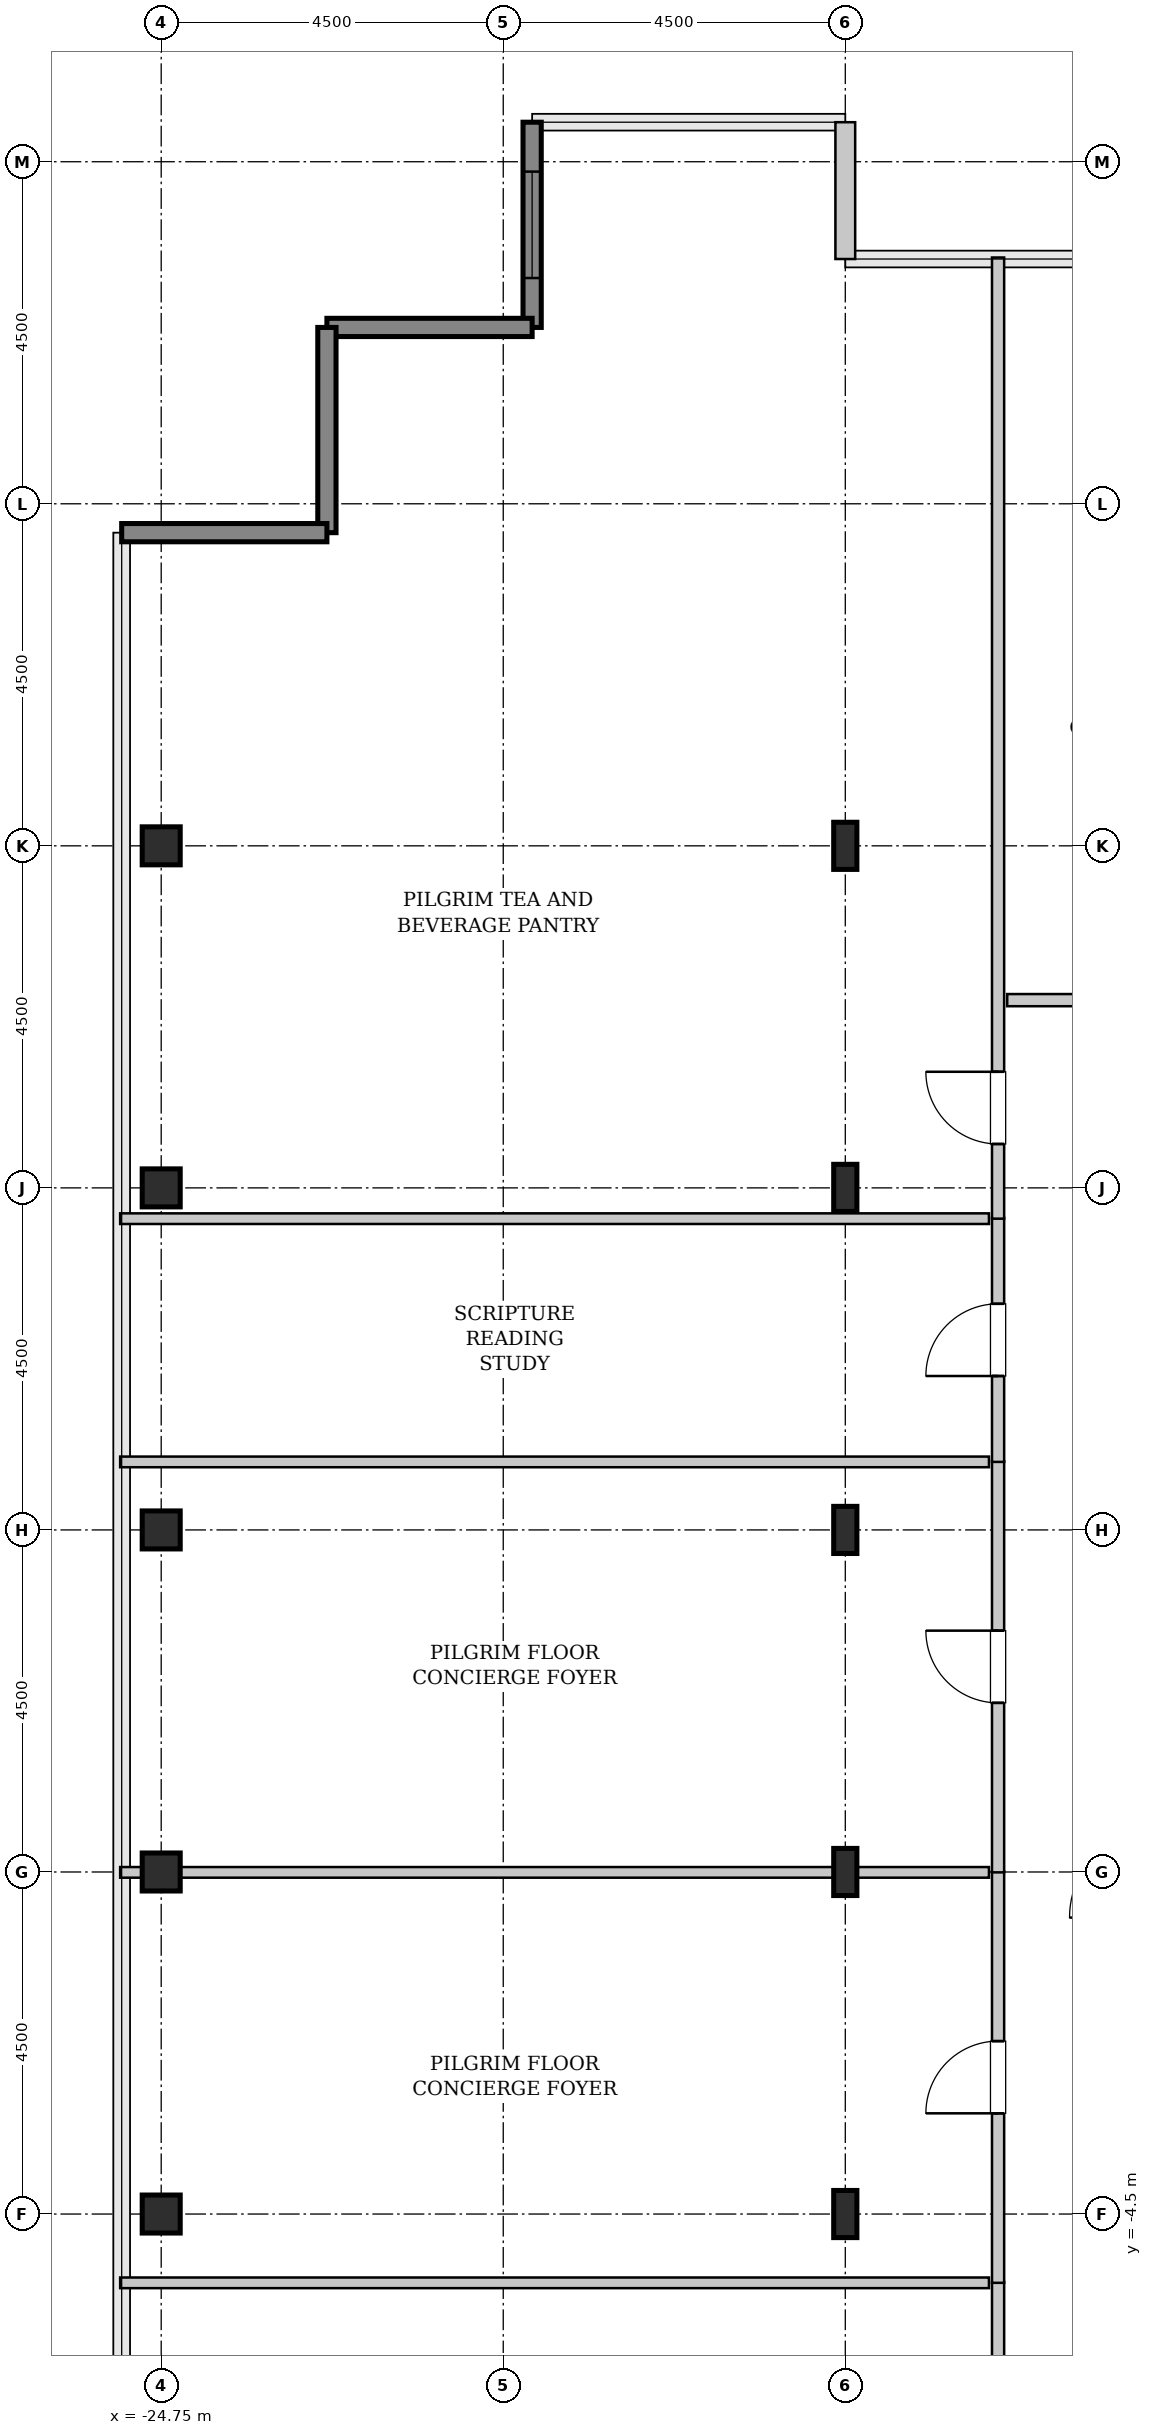
"""IFC4 building model, lengths in metres.
Left out: names, types, materials, properties, quantities, classifications, styles, units other than length and angle.
Written with IfcOpenShell. Run it as: python <this file> out.ifc"""

import sys

from ifc_helpers import new_model, si_unit, direction, frame, frame_2d, origin, origin_2d, place, context, subcontext, project, spatial, rectangle, hollow_rectangle, i_section, extrude, source, transform, mapped, element, fill, save


model = new_model("IFC4")
c1 = context("Model", 3, precision=1e-05, world=origin(), true_north=direction((0.0, 1.0)))
c2 = subcontext(c1, "Body", "Model", "MODEL_VIEW")
j1 = project(units=[si_unit("LENGTHUNIT", "METRE"), si_unit("PLANEANGLEUNIT", "RADIAN")], contexts=[c1])
p1 = place(None, origin())
s1 = spatial("IfcSite", under=j1, at=p1, CompositionType="ELEMENT")
p2 = place(p1, origin())
s2 = spatial("IfcBuilding", under=s1, at=p2, CompositionType="ELEMENT")
p3 = place(p2, frame((0.0, 0.0, 306.4)))
s3 = spatial("IfcBuildingStorey", under=s2, at=p3, CompositionType="ELEMENT", Elevation=306.4)
m1 = source(origin(), c2, "Body", "SweptSolid", [
    extrude(hollow_rectangle(XDim=0.5, YDim=0.5, WallThickness=0.025, InnerFilletRadius=0.025, OuterFilletRadius=0.05, at=origin_2d()), origin(), (0.0, 0.0, 1.0), 3.8),
])
for number, where, z_axis, x_axis in (
    (1, (-24.75, -4.5, 0.0), (0.0, 0.0, 1.0), (1.0, 0.0, 0.0)),
    (2, (-24.75, 0.0, 0.0), (0.0, 0.0, 1.0), (1.0, 0.0, 0.0)),
    (3, (-24.75, 4.5, 0.0), (0.0, 0.0, 1.0), (1.0, 0.0, 0.0)),
    (4, (-24.75, 9.0, 0.0), (0.0, 0.0, 1.0), (1.0, 0.0, 0.0)),
    (5, (-24.75, 13.5, 0.0), (0.0, 0.0, 1.0), (1.0, 0.0, 0.0)),
):
    element("IfcColumn", number, at=place(p3, frame(where, z_axis=z_axis, x_axis=x_axis)), inside=s3, PredefinedType="COLUMN", context=c2, shape_type="MappedRepresentation", body=[
        mapped(m1, transform((0.0, 0.0, 0.0), x_axis=(1.0, 0.0, 0.0), y_axis=(0.0, 1.0, 0.0), z_axis=(0.0, 0.0, 1.0), scale=1.0)),
    ])
m2 = source(origin(), c2, "Body", "SweptSolid", [
    extrude(i_section(OverallWidth=0.305, OverallDepth=0.62, WebThickness=0.021, FlangeThickness=0.04, FilletRadius=0.027, at=origin_2d()), origin(), (0.0, 0.0, 1.0), 3.8),
])
for number, where, z_axis, x_axis in (
    (6, (-15.75, -4.5, 0.0), (0.0, 0.0, 1.0), (1.0, 0.0, 0.0)),
    (7, (-15.75, 0.0, 0.0), (0.0, 0.0, 1.0), (1.0, 0.0, 0.0)),
    (8, (-15.75, 4.5, 0.0), (0.0, 0.0, 1.0), (1.0, 0.0, 0.0)),
    (9, (-15.75, 9.0, 0.0), (0.0, 0.0, 1.0), (1.0, 0.0, 0.0)),
    (10, (-15.75, 13.5, 0.0), (0.0, 0.0, 1.0), (1.0, 0.0, 0.0)),
):
    element("IfcColumn", number, at=place(p3, frame(where, z_axis=z_axis, x_axis=x_axis)), inside=s3, PredefinedType="COLUMN", context=c2, shape_type="MappedRepresentation", body=[
        mapped(m2, transform((0.0, 0.0, 0.0), x_axis=(1.0, 0.0, 0.0), y_axis=(0.0, 1.0, 0.0), z_axis=(0.0, 0.0, 1.0), scale=1.0)),
    ])
m3 = source(origin(), c2, "Body", "SweptSolid", [
    extrude(rectangle(XDim=1.8, YDim=0.26, at=frame_2d((0.9, 0.0))), origin(), (0.0, 0.0, 1.0), 3.55),
])
p4 = place(p3, frame((-15.75, 21.22, 0.0), z_axis=(0.0, 0.0, 1.0), x_axis=(0.0, 1.0, 0.0)))
e11 = element("IfcWall", 11, at=p4, inside=s3, PredefinedType="SOLIDWALL", context=c2, shape_type="MappedRepresentation", body=[
    mapped(m3, transform((0.0, 0.0, 0.0), x_axis=(1.0, 0.0, 0.0), y_axis=(0.0, 1.0, 0.0), z_axis=(0.0, 0.0, 1.0), scale=1.0)),
])
m4 = source(origin(), c2, "Body", "SweptSolid", [
    extrude(rectangle(XDim=2.7, YDim=0.24, at=frame_2d((1.35, 0.0))), origin(), (0.0, 0.0, 1.0), 3.55),
])
p5 = place(p3, frame((-19.87, 23.02, 0.0), z_axis=(0.0, 0.0, 1.0), x_axis=(0.0, -1.0, 0.0)))
e12 = element("IfcWall", 12, at=p5, inside=s3, PredefinedType="SHEAR", context=c2, shape_type="MappedRepresentation", body=[
    mapped(m4, transform((0.0, 0.0, 0.0), x_axis=(1.0, 0.0, 0.0), y_axis=(0.0, 1.0, 0.0), z_axis=(0.0, 0.0, 1.0), scale=1.0)),
])
p6 = place(p5, frame((0.65, 0.0, 0.85)))
e13 = element("IfcOpeningElement", 13, at=p6, cuts=e12, PredefinedType="OPENING", context=c2, shape_type="SweptSolid", body=[
    extrude(rectangle(XDim=1.4, YDim=1.8, at=frame_2d((0.7, 0.9))), frame((0.0, 0.13, 0.0), z_axis=(0.0, -1.0, 0.0), x_axis=(1.0, 0.0, 0.0)), (0.0, 0.0, 1.0), 0.26),
])
for number, where, z_axis, x_axis in (
    (14, (-19.87, 20.32, 0.0), (0.0, 0.0, 1.0), (-1.0, 0.0, 0.0)),
    (15, (-22.57, 20.32, 0.0), (0.0, 0.0, 1.0), (0.0, -1.0, 0.0)),
    (16, (-22.57, 17.62, 0.0), (0.0, 0.0, 1.0), (-1.0, 0.0, 0.0)),
):
    element("IfcWall", number, at=place(p3, frame(where, z_axis=z_axis, x_axis=x_axis)), inside=s3, PredefinedType="SHEAR", context=c2, shape_type="MappedRepresentation", body=[
        mapped(m4, transform((0.0, 0.0, 0.0), x_axis=(1.0, 0.0, 0.0), y_axis=(0.0, 1.0, 0.0), z_axis=(0.0, 0.0, 1.0), scale=1.0)),
    ])
m5 = source(origin(), c2, "Body", "SweptSolid", [
    extrude(rectangle(XDim=3.21, YDim=0.16, at=frame_2d((1.605, 0.0))), origin(), (0.0, 0.0, 1.0), 3.535),
])
p7 = place(p3, frame((-13.74, -8.605, 0.0), z_axis=(0.0, 0.0, 1.0), x_axis=(0.0, 1.0, 0.0)))
e17 = element("IfcWall", 17, at=p7, inside=s3, PredefinedType="PARTITIONING", context=c2, shape_type="MappedRepresentation", body=[
    mapped(m5, transform((0.0, 0.0, 0.0), x_axis=(1.0, 0.0, 0.0), y_axis=(0.0, 1.0, 0.0), z_axis=(0.0, 0.0, 1.0), scale=1.0)),
])
p8 = place(p7, frame((1.13, 0.0, 0.0)))
e18 = element("IfcOpeningElement", 18, at=p8, cuts=e17, PredefinedType="OPENING", context=c2, shape_type="SweptSolid", body=[
    extrude(rectangle(XDim=0.95, YDim=2.1, at=frame_2d((0.475, 1.05))), frame((0.0, 0.09, 0.0), z_axis=(0.0, -1.0, 0.0), x_axis=(1.0, 0.0, 0.0)), (0.0, 0.0, 1.0), 0.18),
])
m6 = source(origin(), c2, "Body", "SweptSolid", [
    extrude(rectangle(XDim=11.43, YDim=0.14, at=frame_2d((5.715, 0.0))), origin(), (0.0, 0.0, 1.0), 3.535),
])
p9 = place(p3, frame((-25.29, -5.405, 0.0), z_axis=(0.0, 0.0, 1.0), x_axis=(1.0, 0.0, 0.0)))
e19 = element("IfcWall", 19, at=p9, inside=s3, PredefinedType="PARTITIONING", context=c2, shape_type="MappedRepresentation", body=[
    mapped(m6, transform((0.0, 0.0, 0.0), x_axis=(1.0, 0.0, 0.0), y_axis=(0.0, 1.0, 0.0), z_axis=(0.0, 0.0, 1.0), scale=1.0)),
])
m7 = source(origin(), c2, "Body", "SweptSolid", [
    extrude(rectangle(XDim=5.41, YDim=0.16, at=frame_2d((2.705, 0.0))), origin(), (0.0, 0.0, 1.0), 3.535),
])
p10 = place(p3, frame((-13.74, -5.405, 0.0), z_axis=(0.0, 0.0, 1.0), x_axis=(0.0, 1.0, 0.0)))
e20 = element("IfcWall", 20, at=p10, inside=s3, PredefinedType="PARTITIONING", context=c2, shape_type="MappedRepresentation", body=[
    mapped(m7, transform((0.0, 0.0, 0.0), x_axis=(1.0, 0.0, 0.0), y_axis=(0.0, 1.0, 0.0), z_axis=(0.0, 0.0, 1.0), scale=1.0)),
])
p11 = place(p10, frame((2.23, 0.0, 0.0)))
e21 = element("IfcOpeningElement", 21, at=p11, cuts=e20, PredefinedType="OPENING", context=c2, shape_type="SweptSolid", body=[
    extrude(rectangle(XDim=0.95, YDim=2.1, at=frame_2d((0.475, 1.05))), frame((0.0, 0.09, 0.0), z_axis=(0.0, -1.0, 0.0), x_axis=(1.0, 0.0, 0.0)), (0.0, 0.0, 1.0), 0.18),
])
m8 = source(origin(), c2, "Body", "SweptSolid", [
    extrude(rectangle(XDim=11.43, YDim=0.14, at=frame_2d((5.715, 0.0))), origin(), (0.0, 0.0, 1.0), 2.975),
])
p12 = place(p3, frame((-25.29, -0.005, 0.0), z_axis=(0.0, 0.0, 1.0), x_axis=(1.0, 0.0, 0.0)))
e22 = element("IfcWall", 22, at=p12, inside=s3, PredefinedType="PARTITIONING", context=c2, shape_type="MappedRepresentation", body=[
    mapped(m8, transform((0.0, 0.0, 0.0), x_axis=(1.0, 0.0, 0.0), y_axis=(0.0, 1.0, 0.0), z_axis=(0.0, 0.0, 1.0), scale=1.0)),
])
p13 = place(p3, frame((-13.74, -0.005, 0.0), z_axis=(0.0, 0.0, 1.0), x_axis=(0.0, 1.0, 0.0)))
e23 = element("IfcWall", 23, at=p13, inside=s3, PredefinedType="PARTITIONING", context=c2, shape_type="MappedRepresentation", body=[
    mapped(m7, transform((0.0, 0.0, 0.0), x_axis=(1.0, 0.0, 0.0), y_axis=(0.0, 1.0, 0.0), z_axis=(0.0, 0.0, 1.0), scale=1.0)),
])
p14 = place(p13, frame((2.23, 0.0, 0.0)))
e24 = element("IfcOpeningElement", 24, at=p14, cuts=e23, PredefinedType="OPENING", context=c2, shape_type="SweptSolid", body=[
    extrude(rectangle(XDim=0.95, YDim=2.1, at=frame_2d((0.475, 1.05))), frame((0.0, 0.09, 0.0), z_axis=(0.0, -1.0, 0.0), x_axis=(1.0, 0.0, 0.0)), (0.0, 0.0, 1.0), 0.18),
])
p15 = place(p3, frame((-25.29, 5.395, 0.0), z_axis=(0.0, 0.0, 1.0), x_axis=(1.0, 0.0, 0.0)))
e25 = element("IfcWall", 25, at=p15, inside=s3, PredefinedType="PARTITIONING", context=c2, shape_type="MappedRepresentation", body=[
    mapped(m6, transform((0.0, 0.0, 0.0), x_axis=(1.0, 0.0, 0.0), y_axis=(0.0, 1.0, 0.0), z_axis=(0.0, 0.0, 1.0), scale=1.0)),
])
p16 = place(p3, frame((-13.74, 5.395, 0.0), z_axis=(0.0, 0.0, 1.0), x_axis=(0.0, 1.0, 0.0)))
e26 = element("IfcWall", 26, at=p16, inside=s3, PredefinedType="PARTITIONING", context=c2, shape_type="MappedRepresentation", body=[
    mapped(m5, transform((0.0, 0.0, 0.0), x_axis=(1.0, 0.0, 0.0), y_axis=(0.0, 1.0, 0.0), z_axis=(0.0, 0.0, 1.0), scale=1.0)),
])
p17 = place(p16, frame((1.13, 0.0, 0.0)))
e27 = element("IfcOpeningElement", 27, at=p17, cuts=e26, PredefinedType="OPENING", context=c2, shape_type="SweptSolid", body=[
    extrude(rectangle(XDim=0.95, YDim=2.1, at=frame_2d((0.475, 1.05))), frame((0.0, 0.09, 0.0), z_axis=(0.0, -1.0, 0.0), x_axis=(1.0, 0.0, 0.0)), (0.0, 0.0, 1.0), 0.18),
])
p18 = place(p3, frame((-25.29, 8.595, 0.0), z_axis=(0.0, 0.0, 1.0), x_axis=(1.0, 0.0, 0.0)))
e28 = element("IfcWall", 28, at=p18, inside=s3, PredefinedType="PARTITIONING", context=c2, shape_type="MappedRepresentation", body=[
    mapped(m8, transform((0.0, 0.0, 0.0), x_axis=(1.0, 0.0, 0.0), y_axis=(0.0, 1.0, 0.0), z_axis=(0.0, 0.0, 1.0), scale=1.0)),
])
m9 = source(origin(), c2, "Body", "SweptSolid", [
    extrude(rectangle(XDim=12.645, YDim=0.16, at=frame_2d((6.323, 0.0))), origin(), (0.0, 0.0, 1.0), 3.535),
])
p19 = place(p3, frame((-13.74, 8.595, 0.0), z_axis=(0.0, 0.0, 1.0), x_axis=(0.0, 1.0, 0.0)))
e29 = element("IfcWall", 29, at=p19, inside=s3, PredefinedType="PARTITIONING", context=c2, shape_type="MappedRepresentation", body=[
    mapped(m9, transform((0.0, 0.0, 0.0), x_axis=(1.0, 0.0, 0.0), y_axis=(0.0, 1.0, 0.0), z_axis=(0.0, 0.0, 1.0), scale=1.0)),
])
p20 = place(p19, frame((0.982, 0.0, 0.0)))
e30 = element("IfcOpeningElement", 30, at=p20, cuts=e29, PredefinedType="OPENING", context=c2, shape_type="SweptSolid", body=[
    extrude(rectangle(XDim=0.95, YDim=2.1, at=frame_2d((0.475, 1.05))), frame((0.0, 0.09, 0.0), z_axis=(0.0, -1.0, 0.0), x_axis=(1.0, 0.0, 0.0)), (0.0, 0.0, 1.0), 0.18),
])
m10 = source(origin(), c2, "Body", "SweptSolid", [
    extrude(rectangle(XDim=4.125, YDim=0.16, at=frame_2d((2.062, 0.0))), origin(), (0.0, 0.0, 1.0), 3.535),
])
p21 = place(p3, frame((-13.62, 11.47, 0.0), z_axis=(0.0, 0.0, 1.0), x_axis=(1.0, 0.0, 0.0)))
e31 = element("IfcWall", 31, at=p21, inside=s3, PredefinedType="PARTITIONING", context=c2, shape_type="MappedRepresentation", body=[
    mapped(m10, transform((0.0, 0.0, 0.0), x_axis=(1.0, 0.0, 0.0), y_axis=(0.0, 1.0, 0.0), z_axis=(0.0, 0.0, 1.0), scale=1.0)),
])
p22 = place(p21, frame((1.587, 0.0, 0.0)))
e32 = element("IfcOpeningElement", 32, at=p22, cuts=e31, PredefinedType="OPENING", context=c2, shape_type="SweptSolid", body=[
    extrude(rectangle(XDim=0.95, YDim=2.1, at=frame_2d((0.475, 1.05))), frame((0.0, 0.09, 0.0), z_axis=(0.0, -1.0, 0.0), x_axis=(1.0, 0.0, 0.0)), (0.0, 0.0, 1.0), 0.18),
])
m11 = source(origin(), c2, "Body", "SweptSolid", [
    extrude(rectangle(XDim=1.4, YDim=1.8, at=frame_2d((0.7, 0.9))), frame((0.0, 0.03, 0.0), z_axis=(0.0, -1.0, 0.0), x_axis=(1.0, 0.0, 0.0)), (0.0, 0.0, 1.0), 0.06),
])
p23 = place(p6, origin())
e33 = element("IfcWindow", 33, at=p23, inside=s3, PartitioningType="SINGLE_PANEL", PredefinedType="WINDOW", context=c2, shape_type="MappedRepresentation", body=[
    mapped(m11, transform((0.0, 0.0, 0.0), x_axis=(1.0, 0.0, 0.0), y_axis=(0.0, 1.0, 0.0), z_axis=(0.0, 0.0, 1.0), scale=1.0)),
])
fill(e13, e33)
m12 = source(origin(), c2, "Body", "SweptSolid", [
    extrude(rectangle(XDim=0.95, YDim=2.1, at=frame_2d((0.475, 1.05))), frame((0.0, 0.025, 0.0), z_axis=(0.0, -1.0, 0.0), x_axis=(1.0, 0.0, 0.0)), (0.0, 0.0, 1.0), 0.05),
])
p24 = place(p11, origin())
e34 = element("IfcDoor", 34, at=p24, inside=s3, OperationType="SINGLE_SWING_LEFT", PredefinedType="DOOR", context=c2, shape_type="MappedRepresentation", body=[
    mapped(m12, transform((0.0, 0.0, 0.0), x_axis=(1.0, 0.0, 0.0), y_axis=(0.0, 1.0, 0.0), z_axis=(0.0, 0.0, 1.0), scale=1.0)),
])
fill(e21, e34)
p25 = place(p14, origin())
e35 = element("IfcDoor", 35, at=p25, inside=s3, OperationType="SINGLE_SWING_RIGHT", PredefinedType="DOOR", context=c2, shape_type="MappedRepresentation", body=[
    mapped(m12, transform((0.0, 0.0, 0.0), x_axis=(1.0, 0.0, 0.0), y_axis=(0.0, 1.0, 0.0), z_axis=(0.0, 0.0, 1.0), scale=1.0)),
])
fill(e24, e35)
p26 = place(p17, origin())
e36 = element("IfcDoor", 36, at=p26, inside=s3, OperationType="SINGLE_SWING_LEFT", PredefinedType="DOOR", context=c2, shape_type="MappedRepresentation", body=[
    mapped(m12, transform((0.0, 0.0, 0.0), x_axis=(1.0, 0.0, 0.0), y_axis=(0.0, 1.0, 0.0), z_axis=(0.0, 0.0, 1.0), scale=1.0)),
])
fill(e27, e36)
p27 = place(p20, origin())
e37 = element("IfcDoor", 37, at=p27, inside=s3, OperationType="SINGLE_SWING_RIGHT", PredefinedType="DOOR", context=c2, shape_type="MappedRepresentation", body=[
    mapped(m12, transform((0.0, 0.0, 0.0), x_axis=(1.0, 0.0, 0.0), y_axis=(0.0, 1.0, 0.0), z_axis=(0.0, 0.0, 1.0), scale=1.0)),
])
fill(e30, e37)
save(model, sys.argv[1])
